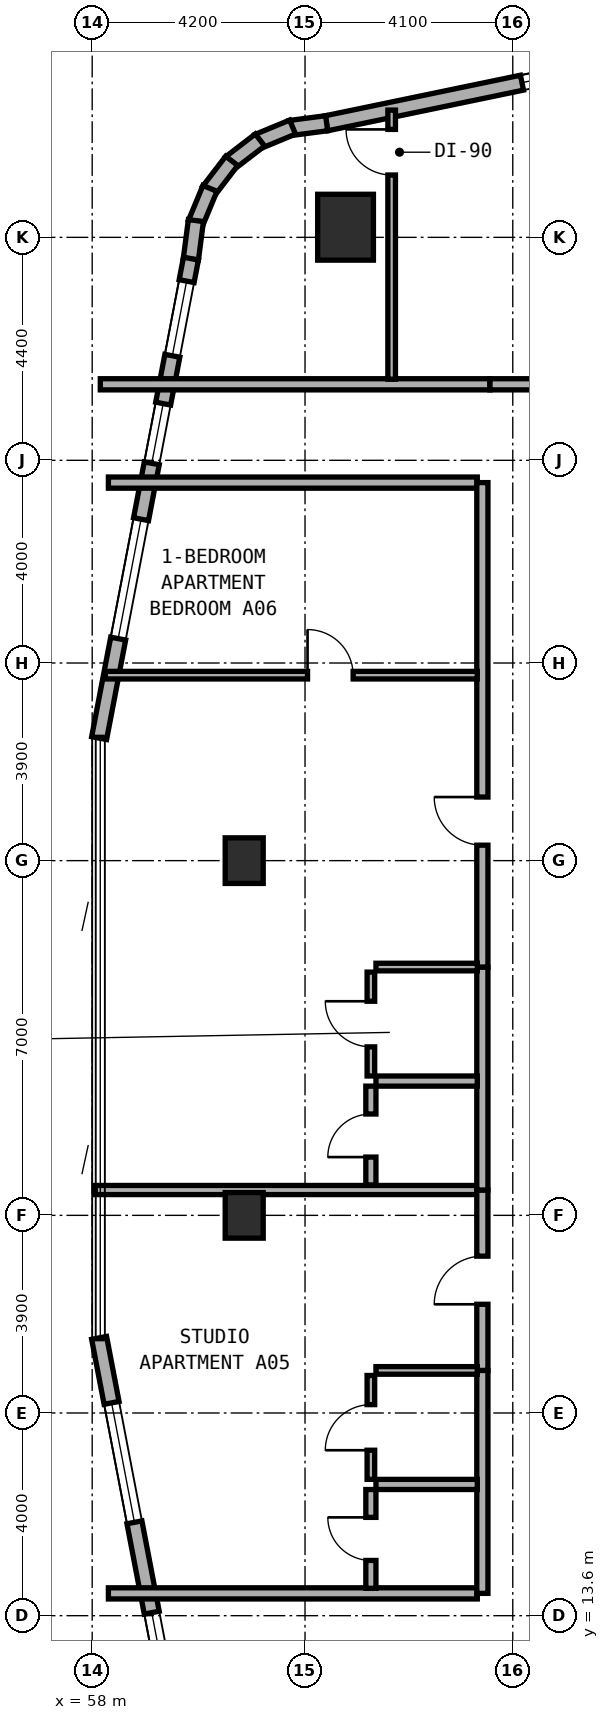
"""IFC4 building model, lengths in metres.
Left out: names, types, materials, properties, quantities, classifications, styles, units other than length and angle.
Written with IfcOpenShell. Run it as: python <this file> out.ifc"""

import sys

from ifc_helpers import new_model, si_unit, direction, frame, frame_2d, origin, origin_2d, place, context, subcontext, project, spatial, rectangle, extrude, element, fill, save


model = new_model("IFC4")
c1 = context("Model", 3, precision=1e-05, world=origin(), true_north=direction((0.0, 1.0)))
c2 = subcontext(c1, "Body", "Model", "MODEL_VIEW")
j1 = project(units=[si_unit("LENGTHUNIT", "METRE"), si_unit("PLANEANGLEUNIT", "RADIAN")], contexts=[c1])
p1 = place(None, origin())
s1 = spatial("IfcSite", under=j1, at=p1, CompositionType="ELEMENT")
p2 = place(p1, origin())
s2 = spatial("IfcBuilding", under=s1, at=p2, CompositionType="ELEMENT")
p3 = place(p2, frame((0.0, 0.0, 27.5)))
s3 = spatial("IfcBuildingStorey", under=s2, at=p3, CompositionType="ELEMENT", Elevation=27.5)
for number, where, z_axis, x_axis in (
    (1, (61.0, 21.5, 0.0), (0.0, 0.0, 1.0), (1.0, 0.0, 0.0)),
    (2, (61.0, 28.5, 0.0), (0.0, 0.0, 1.0), (1.0, 0.0, 0.0)),
):
    element("IfcColumn", number, at=place(p3, frame(where, z_axis=z_axis, x_axis=x_axis)), inside=s3, PredefinedType="COLUMN", context=c2, shape_type="SweptSolid", body=[
        extrude(rectangle(XDim=0.75, YDim=0.9, at=origin_2d()), origin(), (0.0, 0.0, 1.0), 3.5),
    ])
p4 = place(p3, frame((63.0, 41.0, 0.0), z_axis=(0.0, 0.0, 1.0), x_axis=(1.0, 0.0, 0.0)))
e3 = element("IfcColumn", 3, at=p4, inside=s3, PredefinedType="COLUMN", context=c2, shape_type="SweptSolid", body=[
    extrude(rectangle(XDim=1.1, YDim=1.3, at=origin_2d()), origin(), (0.0, 0.0, 1.0), 3.5),
])
p5 = place(p3, frame((71.326, 44.858, 0.0), z_axis=(0.0, 0.0, 1.0), x_axis=(-0.979124350489, -0.203262161453, 0.0)))
e4 = element("IfcWall", 4, at=p5, inside=s3, PredefinedType="STANDARD", context=c2, shape_type="SweptSolid", body=[
    extrude(rectangle(XDim=8.889, YDim=0.3, at=frame_2d((4.445, 0.0))), origin(), (0.0, 0.0, 1.0), 3.25),
])
p6 = place(p5, frame((2.548, 0.0, 0.8)))
e5 = element("IfcOpeningElement", 5, at=p6, cuts=e4, PredefinedType="OPENING", context=c2, shape_type="SweptSolid", body=[
    extrude(rectangle(XDim=2.4, YDim=1.6, at=frame_2d((1.2, 0.8))), frame((0.0, 0.16, 0.0), z_axis=(0.0, -1.0, 0.0), x_axis=(1.0, 0.0, 0.0)), (0.0, 0.0, 1.0), 0.32),
])
p7 = place(p3, frame((62.627, 43.052, 0.0), z_axis=(0.0, 0.0, 1.0), x_axis=(-0.991480488834, -0.130255288807, 0.0)))
e6 = element("IfcWall", 6, at=p7, inside=s3, PredefinedType="STANDARD", context=c2, shape_type="SweptSolid", body=[
    extrude(rectangle(XDim=0.729, YDim=0.3, at=frame_2d((0.365, 0.0))), origin(), (0.0, 0.0, 1.0), 3.25),
])
for number, where, z_axis, x_axis in (
    (7, (61.955, 42.976, 0.0), (0.0, 0.0, 1.0), (-0.924, -0.384, 0.0)),
    (8, (61.311, 42.721, 0.0), (0.0, 0.0, 1.0), (-0.794, -0.608, 0.0)),
    (9, (60.754, 42.309, 0.0), (0.0, 0.0, 1.0), (-0.608, -0.794, 0.0)),
    (10, (60.324, 41.766, 0.0), (0.0, 0.0, 1.0), (-0.383, -0.924, 0.0)),
):
    element("IfcWall", number, at=place(p3, frame(where, z_axis=z_axis, x_axis=x_axis)), inside=s3, PredefinedType="STANDARD", context=c2, shape_type="SweptSolid", body=[
        extrude(rectangle(XDim=0.746, YDim=0.3, at=frame_2d((0.373, 0.0))), origin(), (0.0, 0.0, 1.0), 3.25),
    ])
p8 = place(p3, frame((60.047, 41.131, 0.0), z_axis=(0.0, 0.0, 1.0), x_axis=(-0.129653178221, -0.991559404866, 0.0)))
e11 = element("IfcWall", 11, at=p8, inside=s3, PredefinedType="STANDARD", context=c2, shape_type="SweptSolid", body=[
    extrude(rectangle(XDim=0.764, YDim=0.3, at=frame_2d((0.382, 0.0))), origin(), (0.0, 0.0, 1.0), 3.25),
])
p9 = place(p3, frame((59.949, 40.38, 0.0), z_axis=(0.0, 0.0, 1.0), x_axis=(-0.188087874316, -0.982152203854, 0.0)))
e12 = element("IfcWall", 12, at=p9, inside=s3, PredefinedType="STANDARD", context=c2, shape_type="SweptSolid", body=[
    extrude(rectangle(XDim=9.634, YDim=0.3, at=frame_2d((4.817, 0.0))), origin(), (0.0, 0.0, 1.0), 3.25),
])
p10 = place(p9, frame((0.452, 0.0, 0.85)))
e13 = element("IfcOpeningElement", 13, at=p10, cuts=e12, PredefinedType="OPENING", context=c2, shape_type="SweptSolid", body=[
    extrude(rectangle(XDim=1.5, YDim=1.5, at=frame_2d((0.75, 0.75))), frame((0.0, 0.16, 0.0), z_axis=(0.0, -1.0, 0.0), x_axis=(1.0, 0.0, 0.0)), (0.0, 0.0, 1.0), 0.32),
])
p11 = place(p9, frame((2.913, 0.0, 0.85)))
e14 = element("IfcOpeningElement", 14, at=p11, cuts=e12, PredefinedType="OPENING", context=c2, shape_type="SweptSolid", body=[
    extrude(rectangle(XDim=1.2, YDim=1.5, at=frame_2d((0.6, 0.75))), frame((0.0, 0.16, 0.0), z_axis=(0.0, -1.0, 0.0), x_axis=(1.0, 0.0, 0.0)), (0.0, 0.0, 1.0), 0.32),
])
p12 = place(p9, frame((5.235, 0.0, 0.8)))
e15 = element("IfcOpeningElement", 15, at=p12, cuts=e12, PredefinedType="OPENING", context=c2, shape_type="SweptSolid", body=[
    extrude(rectangle(XDim=2.4, YDim=1.6, at=frame_2d((1.2, 0.8))), frame((0.0, 0.16, 0.0), z_axis=(0.0, -1.0, 0.0), x_axis=(1.0, 0.0, 0.0)), (0.0, 0.0, 1.0), 0.32),
])
p13 = place(p3, frame((58.137, 19.082, 0.0), z_axis=(0.0, 0.0, 1.0), x_axis=(0.188087874316, -0.982152203854, 0.0)))
e16 = element("IfcWall", 16, at=p13, inside=s3, PredefinedType="STANDARD", context=c2, shape_type="SweptSolid", body=[
    extrude(rectangle(XDim=9.634, YDim=0.3, at=frame_2d((4.817, 0.0))), origin(), (0.0, 0.0, 1.0), 3.25),
])
p14 = place(p13, frame((1.306, 0.0, 0.8)))
e17 = element("IfcOpeningElement", 17, at=p14, cuts=e16, PredefinedType="OPENING", context=c2, shape_type="SweptSolid", body=[
    extrude(rectangle(XDim=2.4, YDim=1.6, at=frame_2d((1.2, 0.8))), frame((0.0, 0.16, 0.0), z_axis=(0.0, -1.0, 0.0), x_axis=(1.0, 0.0, 0.0)), (0.0, 0.0, 1.0), 0.32),
])
p15 = place(p13, frame((5.521, 0.0, 0.85)))
e18 = element("IfcOpeningElement", 18, at=p15, cuts=e16, PredefinedType="OPENING", context=c2, shape_type="SweptSolid", body=[
    extrude(rectangle(XDim=1.2, YDim=1.5, at=frame_2d((0.6, 0.75))), frame((0.0, 0.16, 0.0), z_axis=(0.0, -1.0, 0.0), x_axis=(1.0, 0.0, 0.0)), (0.0, 0.0, 1.0), 0.32),
])
p16 = place(p13, frame((7.682, 0.0, 0.85)))
e19 = element("IfcOpeningElement", 19, at=p16, cuts=e16, PredefinedType="OPENING", context=c2, shape_type="SweptSolid", body=[
    extrude(rectangle(XDim=1.5, YDim=1.5, at=frame_2d((0.75, 0.75))), frame((0.0, 0.16, 0.0), z_axis=(0.0, -1.0, 0.0), x_axis=(1.0, 0.0, 0.0)), (0.0, 0.0, 1.0), 0.32),
])
p17 = place(p3, frame((58.16, 37.9, 0.0), z_axis=(0.0, 0.0, 1.0), x_axis=(1.0, 0.0, 0.0)))
e20 = element("IfcWall", 20, at=p17, inside=s3, PredefinedType="SOLIDWALL", context=c2, shape_type="SweptSolid", body=[
    extrude(rectangle(XDim=7.69, YDim=0.22, at=frame_2d((3.845, 0.0))), origin(), (0.0, 0.0, 1.0), 2.865),
])
p18 = place(p3, frame((65.85, 37.9, 0.0), z_axis=(0.0, 0.0, 1.0), x_axis=(1.0, 0.0, 0.0)))
e21 = element("IfcWall", 21, at=p18, inside=s3, PredefinedType="SOLIDWALL", context=c2, shape_type="SweptSolid", body=[
    extrude(rectangle(XDim=8.87, YDim=0.22, at=frame_2d((4.435, 0.0))), origin(), (0.0, 0.0, 1.0), 2.725),
])
p19 = place(p18, frame((3.96, 0.0, 0.0)))
e22 = element("IfcOpeningElement", 22, at=p19, cuts=e21, PredefinedType="OPENING", context=c2, shape_type="SweptSolid", body=[
    extrude(rectangle(XDim=0.95, YDim=2.1, at=frame_2d((0.475, 1.05))), frame((0.0, 0.12, 0.0), z_axis=(0.0, -1.0, 0.0), x_axis=(1.0, 0.0, 0.0)), (0.0, 0.0, 1.0), 0.24),
])
p20 = place(p3, frame((63.91, 38.0, 0.0), z_axis=(0.0, 0.0, 1.0), x_axis=(0.0, 1.0, 0.0)))
e23 = element("IfcWall", 23, at=p20, inside=s3, PredefinedType="PARTITIONING", context=c2, shape_type="SweptSolid", body=[
    extrude(rectangle(XDim=5.311, YDim=0.15, at=frame_2d((2.656, 0.0))), origin(), (0.0, 0.0, 1.0), 2.865),
])
p21 = place(p20, frame((4.03, 0.0, 0.0)))
e24 = element("IfcOpeningElement", 24, at=p21, cuts=e23, PredefinedType="OPENING", context=c2, shape_type="SweptSolid", body=[
    extrude(rectangle(XDim=0.9, YDim=2.1, at=frame_2d((0.45, 1.05))), frame((0.0, 0.085, 0.0), z_axis=(0.0, -1.0, 0.0), x_axis=(1.0, 0.0, 0.0)), (0.0, 0.0, 1.0), 0.17),
])
for number, where, z_axis, x_axis in (
    (25, (58.32, 14.04, 0.0), (0.0, 0.0, 1.0), (1.0, 0.0, 0.0)),
    (26, (58.32, 35.96, 0.0), (0.0, 0.0, 1.0), (1.0, 0.0, 0.0)),
):
    element("IfcWall", number, at=place(p3, frame(where, z_axis=z_axis, x_axis=x_axis)), inside=s3, PredefinedType="SOLIDWALL", context=c2, shape_type="SweptSolid", body=[
        extrude(rectangle(XDim=7.28, YDim=0.22, at=frame_2d((3.64, 0.0))), origin(), (0.0, 0.0, 1.0), 2.865),
    ])
p22 = place(p3, frame((58.06, 22.0, 0.0), z_axis=(0.0, 0.0, 1.0), x_axis=(1.0, 0.0, 0.0)))
e27 = element("IfcWall", 27, at=p22, inside=s3, PredefinedType="SOLIDWALL", context=c2, shape_type="SweptSolid", body=[
    extrude(rectangle(XDim=7.64, YDim=0.18, at=frame_2d((3.82, 0.0))), origin(), (0.0, 0.0, 1.0), 2.865),
])
p23 = place(p3, frame((65.7, 14.04, 0.0), z_axis=(0.0, 0.0, 1.0), x_axis=(0.0, 1.0, 0.0)))
e28 = element("IfcWall", 28, at=p23, inside=s3, PredefinedType="SOLIDWALL", context=c2, shape_type="SweptSolid", body=[
    extrude(rectangle(XDim=4.4, YDim=0.22, at=frame_2d((2.2, 0.0))), origin(), (0.0, 0.0, 1.0), 3.22),
])
p24 = place(p3, frame((65.7, 18.44, 0.0), z_axis=(0.0, 0.0, 1.0), x_axis=(0.0, 1.0, 0.0)))
e29 = element("IfcWall", 29, at=p24, inside=s3, PredefinedType="SOLIDWALL", context=c2, shape_type="SweptSolid", body=[
    extrude(rectangle(XDim=3.56, YDim=0.22, at=frame_2d((1.78, 0.0))), origin(), (0.0, 0.0, 1.0), 2.725),
])
p25 = place(p24, frame((1.305, 0.0, 0.0)))
e30 = element("IfcOpeningElement", 30, at=p25, cuts=e29, PredefinedType="OPENING", context=c2, shape_type="SweptSolid", body=[
    extrude(rectangle(XDim=0.95, YDim=2.1, at=frame_2d((0.475, 1.05))), frame((0.0, 0.12, 0.0), z_axis=(0.0, -1.0, 0.0), x_axis=(1.0, 0.0, 0.0)), (0.0, 0.0, 1.0), 0.24),
])
p26 = place(p3, frame((63.6, 16.19, 0.0), z_axis=(0.0, 0.0, 1.0), x_axis=(1.0, 0.0, 0.0)))
e31 = element("IfcWall", 31, at=p26, inside=s3, PredefinedType="PLUMBINGWALL", context=c2, shape_type="SweptSolid", body=[
    extrude(rectangle(XDim=2.0, YDim=0.2, at=frame_2d((1.0, 0.0))), origin(), (0.0, 0.0, 1.0), 3.22),
])
p27 = place(p3, frame((63.6, 18.44, 0.0), z_axis=(0.0, 0.0, 1.0), x_axis=(1.0, 0.0, 0.0)))
e32 = element("IfcWall", 32, at=p27, inside=s3, PredefinedType="PARTITIONING", context=c2, shape_type="SweptSolid", body=[
    extrude(rectangle(XDim=2.0, YDim=0.15, at=frame_2d((1.0, 0.0))), origin(), (0.0, 0.0, 1.0), 3.22),
])
p28 = place(p3, frame((63.5, 14.14, 0.0), z_axis=(0.0, 0.0, 1.0), x_axis=(0.0, 1.0, 0.0)))
e33 = element("IfcWall", 33, at=p28, inside=s3, PredefinedType="PLUMBINGWALL", context=c2, shape_type="SweptSolid", body=[
    extrude(rectangle(XDim=1.95, YDim=0.2, at=frame_2d((0.975, 0.0))), origin(), (0.0, 0.0, 1.0), 3.22),
])
p29 = place(p28, frame((0.55, 0.0, 0.0)))
e34 = element("IfcOpeningElement", 34, at=p29, cuts=e33, PredefinedType="OPENING", context=c2, shape_type="SweptSolid", body=[
    extrude(rectangle(XDim=0.85, YDim=2.1, at=frame_2d((0.425, 1.05))), frame((0.0, 0.11, 0.0), z_axis=(0.0, -1.0, 0.0), x_axis=(1.0, 0.0, 0.0)), (0.0, 0.0, 1.0), 0.22),
])
p30 = place(p3, frame((63.5, 16.29, 0.0), z_axis=(0.0, 0.0, 1.0), x_axis=(0.0, 1.0, 0.0)))
e35 = element("IfcWall", 35, at=p30, inside=s3, PredefinedType="PARTITIONING", context=c2, shape_type="SweptSolid", body=[
    extrude(rectangle(XDim=2.05, YDim=0.15, at=frame_2d((1.025, 0.0))), origin(), (0.0, 0.0, 1.0), 3.22),
])
p31 = place(p30, frame((0.575, 0.0, 0.0)))
e36 = element("IfcOpeningElement", 36, at=p31, cuts=e35, PredefinedType="OPENING", context=c2, shape_type="SweptSolid", body=[
    extrude(rectangle(XDim=0.9, YDim=2.1, at=frame_2d((0.45, 1.05))), frame((0.0, 0.085, 0.0), z_axis=(0.0, -1.0, 0.0), x_axis=(1.0, 0.0, 0.0)), (0.0, 0.0, 1.0), 0.17),
])
p32 = place(p3, frame((65.7, 22.0, 0.0), z_axis=(0.0, 0.0, 1.0), x_axis=(0.0, 1.0, 0.0)))
e37 = element("IfcWall", 37, at=p32, inside=s3, PredefinedType="SOLIDWALL", context=c2, shape_type="SweptSolid", body=[
    extrude(rectangle(XDim=4.4, YDim=0.22, at=frame_2d((2.2, 0.0))), origin(), (0.0, 0.0, 1.0), 3.22),
])
p33 = place(p3, frame((65.7, 26.4, 0.0), z_axis=(0.0, 0.0, 1.0), x_axis=(0.0, 1.0, 0.0)))
e38 = element("IfcWall", 38, at=p33, inside=s3, PredefinedType="SOLIDWALL", context=c2, shape_type="SweptSolid", body=[
    extrude(rectangle(XDim=9.56, YDim=0.22, at=frame_2d((4.78, 0.0))), origin(), (0.0, 0.0, 1.0), 2.725),
])
p34 = place(p33, frame((2.405, 0.0, 0.0)))
e39 = element("IfcOpeningElement", 39, at=p34, cuts=e38, PredefinedType="OPENING", context=c2, shape_type="SweptSolid", body=[
    extrude(rectangle(XDim=0.95, YDim=2.1, at=frame_2d((0.475, 1.05))), frame((0.0, 0.12, 0.0), z_axis=(0.0, -1.0, 0.0), x_axis=(1.0, 0.0, 0.0)), (0.0, 0.0, 1.0), 0.24),
])
p35 = place(p3, frame((58.26, 32.16, 0.0), z_axis=(0.0, 0.0, 1.0), x_axis=(1.0, 0.0, 0.0)))
e40 = element("IfcWall", 40, at=p35, inside=s3, PredefinedType="PARTITIONING", context=c2, shape_type="SweptSolid", body=[
    extrude(rectangle(XDim=7.34, YDim=0.15, at=frame_2d((3.67, 0.0))), origin(), (0.0, 0.0, 1.0), 2.865),
])
p36 = place(p35, frame((3.99, 0.0, 0.0)))
e41 = element("IfcOpeningElement", 41, at=p36, cuts=e40, PredefinedType="OPENING", context=c2, shape_type="SweptSolid", body=[
    extrude(rectangle(XDim=0.9, YDim=2.1, at=frame_2d((0.45, 1.05))), frame((0.0, 0.085, 0.0), z_axis=(0.0, -1.0, 0.0), x_axis=(1.0, 0.0, 0.0)), (0.0, 0.0, 1.0), 0.17),
])
p37 = place(p3, frame((63.6, 24.15, 0.0), z_axis=(0.0, 0.0, 1.0), x_axis=(1.0, 0.0, 0.0)))
e42 = element("IfcWall", 42, at=p37, inside=s3, PredefinedType="PLUMBINGWALL", context=c2, shape_type="SweptSolid", body=[
    extrude(rectangle(XDim=2.0, YDim=0.2, at=frame_2d((1.0, 0.0))), origin(), (0.0, 0.0, 1.0), 3.22),
])
p38 = place(p3, frame((63.6, 26.4, 0.0), z_axis=(0.0, 0.0, 1.0), x_axis=(1.0, 0.0, 0.0)))
e43 = element("IfcWall", 43, at=p38, inside=s3, PredefinedType="PARTITIONING", context=c2, shape_type="SweptSolid", body=[
    extrude(rectangle(XDim=2.0, YDim=0.15, at=frame_2d((1.0, 0.0))), origin(), (0.0, 0.0, 1.0), 3.22),
])
p39 = place(p3, frame((63.5, 22.1, 0.0), z_axis=(0.0, 0.0, 1.0), x_axis=(0.0, 1.0, 0.0)))
e44 = element("IfcWall", 44, at=p39, inside=s3, PredefinedType="PLUMBINGWALL", context=c2, shape_type="SweptSolid", body=[
    extrude(rectangle(XDim=1.95, YDim=0.2, at=frame_2d((0.975, 0.0))), origin(), (0.0, 0.0, 1.0), 3.22),
])
p40 = place(p39, frame((0.55, 0.0, 0.0)))
e45 = element("IfcOpeningElement", 45, at=p40, cuts=e44, PredefinedType="OPENING", context=c2, shape_type="SweptSolid", body=[
    extrude(rectangle(XDim=0.85, YDim=2.1, at=frame_2d((0.425, 1.05))), frame((0.0, 0.11, 0.0), z_axis=(0.0, -1.0, 0.0), x_axis=(1.0, 0.0, 0.0)), (0.0, 0.0, 1.0), 0.22),
])
p41 = place(p3, frame((63.5, 24.25, 0.0), z_axis=(0.0, 0.0, 1.0), x_axis=(0.0, 1.0, 0.0)))
e46 = element("IfcWall", 46, at=p41, inside=s3, PredefinedType="PARTITIONING", context=c2, shape_type="SweptSolid", body=[
    extrude(rectangle(XDim=2.05, YDim=0.15, at=frame_2d((1.025, 0.0))), origin(), (0.0, 0.0, 1.0), 3.22),
])
p42 = place(p41, frame((0.575, 0.0, 0.0)))
e47 = element("IfcOpeningElement", 47, at=p42, cuts=e46, PredefinedType="OPENING", context=c2, shape_type="SweptSolid", body=[
    extrude(rectangle(XDim=0.9, YDim=2.1, at=frame_2d((0.45, 1.05))), frame((0.0, 0.085, 0.0), z_axis=(0.0, -1.0, 0.0), x_axis=(1.0, 0.0, 0.0)), (0.0, 0.0, 1.0), 0.17),
])
p43 = place(p6, origin())
e48 = element("IfcWindow", 48, at=p43, inside=s3, PartitioningType="SINGLE_PANEL", PredefinedType="WINDOW", context=c2, shape_type="SweptSolid", body=[
    extrude(rectangle(XDim=2.4, YDim=1.6, at=frame_2d((1.2, 0.8))), frame((0.0, 0.03, 0.0), z_axis=(0.0, -1.0, 0.0), x_axis=(1.0, 0.0, 0.0)), (0.0, 0.0, 1.0), 0.06),
])
fill(e5, e48)
p44 = place(p10, origin())
e49 = element("IfcWindow", 49, at=p44, inside=s3, PartitioningType="SINGLE_PANEL", PredefinedType="WINDOW", context=c2, shape_type="SweptSolid", body=[
    extrude(rectangle(XDim=1.5, YDim=1.5, at=frame_2d((0.75, 0.75))), frame((0.0, 0.03, 0.0), z_axis=(0.0, -1.0, 0.0), x_axis=(1.0, 0.0, 0.0)), (0.0, 0.0, 1.0), 0.06),
])
fill(e13, e49)
p45 = place(p11, origin())
e50 = element("IfcWindow", 50, at=p45, inside=s3, PartitioningType="SINGLE_PANEL", PredefinedType="WINDOW", context=c2, shape_type="SweptSolid", body=[
    extrude(rectangle(XDim=1.2, YDim=1.5, at=frame_2d((0.6, 0.75))), frame((0.0, 0.03, 0.0), z_axis=(0.0, -1.0, 0.0), x_axis=(1.0, 0.0, 0.0)), (0.0, 0.0, 1.0), 0.06),
])
fill(e14, e50)
p46 = place(p12, origin())
e51 = element("IfcWindow", 51, at=p46, inside=s3, PartitioningType="SINGLE_PANEL", PredefinedType="WINDOW", context=c2, shape_type="SweptSolid", body=[
    extrude(rectangle(XDim=2.4, YDim=1.6, at=frame_2d((1.2, 0.8))), frame((0.0, 0.03, 0.0), z_axis=(0.0, -1.0, 0.0), x_axis=(1.0, 0.0, 0.0)), (0.0, 0.0, 1.0), 0.06),
])
fill(e15, e51)
p47 = place(p14, origin())
e52 = element("IfcWindow", 52, at=p47, inside=s3, PartitioningType="SINGLE_PANEL", PredefinedType="WINDOW", context=c2, shape_type="SweptSolid", body=[
    extrude(rectangle(XDim=2.4, YDim=1.6, at=frame_2d((1.2, 0.8))), frame((0.0, 0.03, 0.0), z_axis=(0.0, -1.0, 0.0), x_axis=(1.0, 0.0, 0.0)), (0.0, 0.0, 1.0), 0.06),
])
fill(e17, e52)
p48 = place(p15, origin())
e53 = element("IfcWindow", 53, at=p48, inside=s3, PartitioningType="SINGLE_PANEL", PredefinedType="WINDOW", context=c2, shape_type="SweptSolid", body=[
    extrude(rectangle(XDim=1.2, YDim=1.5, at=frame_2d((0.6, 0.75))), frame((0.0, 0.03, 0.0), z_axis=(0.0, -1.0, 0.0), x_axis=(1.0, 0.0, 0.0)), (0.0, 0.0, 1.0), 0.06),
])
fill(e18, e53)
p49 = place(p21, origin())
e54 = element("IfcDoor", 54, at=p49, inside=s3, OperationType="SINGLE_SWING_RIGHT", PredefinedType="DOOR", context=c2, shape_type="SweptSolid", body=[
    extrude(rectangle(XDim=0.9, YDim=2.1, at=frame_2d((0.45, 1.05))), frame((0.0, 0.025, 0.0), z_axis=(0.0, -1.0, 0.0), x_axis=(1.0, 0.0, 0.0)), (0.0, 0.0, 1.0), 0.05),
])
fill(e24, e54)
p50 = place(p25, origin())
e55 = element("IfcDoor", 55, at=p50, inside=s3, OperationType="SINGLE_SWING_LEFT", PredefinedType="DOOR", context=c2, shape_type="SweptSolid", body=[
    extrude(rectangle(XDim=0.95, YDim=2.1, at=frame_2d((0.475, 1.05))), frame((0.0, 0.025, 0.0), z_axis=(0.0, -1.0, 0.0), x_axis=(1.0, 0.0, 0.0)), (0.0, 0.0, 1.0), 0.05),
])
fill(e30, e55)
p51 = place(p29, origin())
e56 = element("IfcDoor", 56, at=p51, inside=s3, OperationType="SINGLE_SWING_RIGHT", PredefinedType="DOOR", context=c2, shape_type="SweptSolid", body=[
    extrude(rectangle(XDim=0.85, YDim=2.1, at=frame_2d((0.425, 1.05))), frame((0.0, 0.025, 0.0), z_axis=(0.0, -1.0, 0.0), x_axis=(1.0, 0.0, 0.0)), (0.0, 0.0, 1.0), 0.05),
])
fill(e34, e56)
p52 = place(p31, origin())
e57 = element("IfcDoor", 57, at=p52, inside=s3, OperationType="SINGLE_SWING_LEFT", PredefinedType="DOOR", context=c2, shape_type="SweptSolid", body=[
    extrude(rectangle(XDim=0.9, YDim=2.1, at=frame_2d((0.45, 1.05))), frame((0.0, 0.025, 0.0), z_axis=(0.0, -1.0, 0.0), x_axis=(1.0, 0.0, 0.0)), (0.0, 0.0, 1.0), 0.05),
])
fill(e36, e57)
p53 = place(p34, origin())
e58 = element("IfcDoor", 58, at=p53, inside=s3, OperationType="SINGLE_SWING_RIGHT", PredefinedType="DOOR", context=c2, shape_type="SweptSolid", body=[
    extrude(rectangle(XDim=0.95, YDim=2.1, at=frame_2d((0.475, 1.05))), frame((0.0, 0.025, 0.0), z_axis=(0.0, -1.0, 0.0), x_axis=(1.0, 0.0, 0.0)), (0.0, 0.0, 1.0), 0.05),
])
fill(e39, e58)
p54 = place(p36, origin())
e59 = element("IfcDoor", 59, at=p54, inside=s3, OperationType="SINGLE_SWING_LEFT", PredefinedType="DOOR", context=c2, shape_type="SweptSolid", body=[
    extrude(rectangle(XDim=0.9, YDim=2.1, at=frame_2d((0.45, 1.05))), frame((0.0, 0.025, 0.0), z_axis=(0.0, -1.0, 0.0), x_axis=(1.0, 0.0, 0.0)), (0.0, 0.0, 1.0), 0.05),
])
fill(e41, e59)
p55 = place(p40, origin())
e60 = element("IfcDoor", 60, at=p55, inside=s3, OperationType="SINGLE_SWING_LEFT", PredefinedType="DOOR", context=c2, shape_type="SweptSolid", body=[
    extrude(rectangle(XDim=0.85, YDim=2.1, at=frame_2d((0.425, 1.05))), frame((0.0, 0.025, 0.0), z_axis=(0.0, -1.0, 0.0), x_axis=(1.0, 0.0, 0.0)), (0.0, 0.0, 1.0), 0.05),
])
fill(e45, e60)
p56 = place(p42, origin())
e61 = element("IfcDoor", 61, at=p56, inside=s3, OperationType="SINGLE_SWING_RIGHT", PredefinedType="DOOR", context=c2, shape_type="SweptSolid", body=[
    extrude(rectangle(XDim=0.9, YDim=2.1, at=frame_2d((0.45, 1.05))), frame((0.0, 0.025, 0.0), z_axis=(0.0, -1.0, 0.0), x_axis=(1.0, 0.0, 0.0)), (0.0, 0.0, 1.0), 0.05),
])
fill(e47, e61)
save(model, sys.argv[1])
